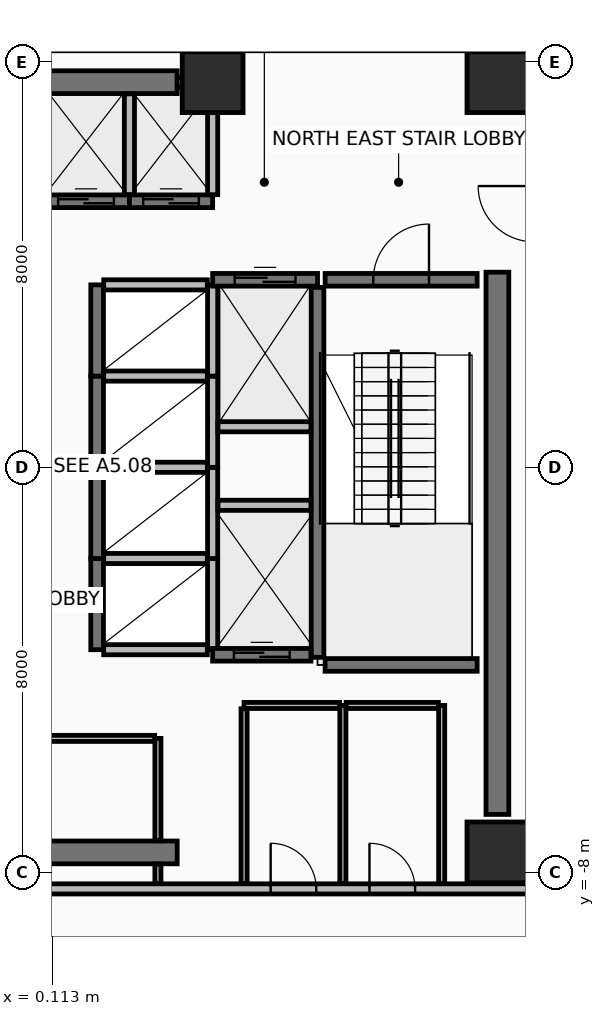
"""IFC4 building model, lengths in metres.
Left out: names, types, materials, properties, quantities, classifications, styles, units other than length and angle.
Written with IfcOpenShell. Run it as: python <this file> out.ifc"""

import sys

from ifc_helpers import new_model, si_unit, direction, frame, frame_2d, origin, origin_2d, place, context, subcontext, project, spatial, rectangle, extrude, element, fill, save


model = new_model("IFC4")
c1 = context("Model", 3, precision=1e-05, world=origin(), true_north=direction((0.0, 1.0)))
c2 = subcontext(c1, "Body", "Model", "MODEL_VIEW")
j1 = project(units=[si_unit("LENGTHUNIT", "METRE"), si_unit("PLANEANGLEUNIT", "RADIAN")], contexts=[c1])
p1 = place(None, origin())
s1 = spatial("IfcSite", under=j1, at=p1, CompositionType="ELEMENT")
p2 = place(p1, origin())
s2 = spatial("IfcBuilding", under=s1, at=p2, CompositionType="ELEMENT")
p3 = place(p2, frame((0.0, 0.0, 160.4)))
s3 = spatial("IfcBuildingStorey", under=s2, at=p3, CompositionType="ELEMENT", Elevation=160.4)
for number, where, z_axis, x_axis in (
    (1, (8.9, -7.6, 0.0), (0.0, 0.0, 1.0), (1.0, 0.0, 0.0)),
    (2, (8.9, 7.6, 0.0), (0.0, 0.0, 1.0), (1.0, 0.0, 0.0)),
    (3, (3.28, 7.6, 0.0), (0.0, 0.0, 1.0), (1.0, 0.0, 0.0)),
):
    element("IfcColumn", number, at=place(p3, frame(where, z_axis=z_axis, x_axis=x_axis)), inside=s3, PredefinedType="COLUMN", context=c2, shape_type="SweptSolid", body=[
        extrude(rectangle(XDim=1.2, YDim=1.2, at=origin_2d()), origin(), (0.0, 0.0, 1.0), 4.75),
    ])
for number, where, z_axis, x_axis in (
    (4, (-2.8, -7.6, 0.0), (0.0, 0.0, 1.0), (1.0, 0.0, 0.0)),
    (5, (-2.8, 7.6, 0.0), (0.0, 0.0, 1.0), (1.0, 0.0, 0.0)),
):
    element("IfcWall", number, at=place(p3, frame(where, z_axis=z_axis, x_axis=x_axis)), inside=s3, PredefinedType="SHEAR", context=c2, shape_type="SweptSolid", body=[
        extrude(rectangle(XDim=5.38, YDim=0.45, at=frame_2d((2.69, 0.0))), origin(), (0.0, 0.0, 1.0), 4.555),
    ])
p4 = place(p3, frame((8.9, -6.85, 0.0), z_axis=(0.0, 0.0, 1.0), x_axis=(0.0, 1.0, 0.0)))
e6 = element("IfcWall", 6, at=p4, inside=s3, PredefinedType="SHEAR", context=c2, shape_type="SweptSolid", body=[
    extrude(rectangle(XDim=10.7, YDim=0.45, at=frame_2d((5.35, 0.0))), origin(), (0.0, 0.0, 1.0), 4.555),
])
p5 = place(p3, frame((-9.62, -8.32, 0.0), z_axis=(0.0, 0.0, 1.0), x_axis=(1.0, 0.0, 0.0)))
e7 = element("IfcWall", 7, at=p5, inside=s3, PredefinedType="PARTITIONING", context=c2, shape_type="SweptSolid", body=[
    extrude(rectangle(XDim=19.24, YDim=0.2, at=frame_2d((9.62, 0.0))), origin(), (0.0, 0.0, 1.0), 2.35),
])
p6 = place(p5, frame((8.57, 0.0, 0.0)))
e8 = element("IfcOpeningElement", 8, at=p6, cuts=e7, PredefinedType="OPENING", context=c2, shape_type="SweptSolid", body=[
    extrude(rectangle(XDim=0.9, YDim=2.1, at=frame_2d((0.45, 1.05))), frame((0.0, 0.11, 0.0), z_axis=(0.0, -1.0, 0.0), x_axis=(1.0, 0.0, 0.0)), (0.0, 0.0, 1.0), 0.22),
])
p7 = place(p5, frame((14.045, 0.0, 0.0)))
e9 = element("IfcOpeningElement", 9, at=p7, cuts=e7, PredefinedType="OPENING", context=c2, shape_type="SweptSolid", body=[
    extrude(rectangle(XDim=0.9, YDim=2.1, at=frame_2d((0.45, 1.05))), frame((0.0, 0.11, 0.0), z_axis=(0.0, -1.0, 0.0), x_axis=(1.0, 0.0, 0.0)), (0.0, 0.0, 1.0), 0.22),
])
p8 = place(p5, frame((15.995, 0.0, 0.0)))
e10 = element("IfcOpeningElement", 10, at=p8, cuts=e7, PredefinedType="OPENING", context=c2, shape_type="SweptSolid", body=[
    extrude(rectangle(XDim=0.9, YDim=2.1, at=frame_2d((0.45, 1.05))), frame((0.0, 0.11, 0.0), z_axis=(0.0, -1.0, 0.0), x_axis=(1.0, 0.0, 0.0)), (0.0, 0.0, 1.0), 0.22),
])
p9 = place(p3, frame((5.35, -3.75, 0.0), z_axis=(0.0, 0.0, 1.0), x_axis=(0.0, 1.0, 0.0)))
e11 = element("IfcWall", 11, at=p9, inside=s3, PredefinedType="SHEAR", context=c2, shape_type="SweptSolid", body=[
    extrude(rectangle(XDim=7.3, YDim=0.25, at=frame_2d((3.65, 0.0))), origin(), (0.0, 0.0, 1.0), 4.555),
])
p10 = place(p3, frame((5.5, 3.7, 0.0), z_axis=(0.0, 0.0, 1.0), x_axis=(1.0, 0.0, 0.0)))
e12 = element("IfcWall", 12, at=p10, inside=s3, PredefinedType="SHEAR", context=c2, shape_type="SweptSolid", body=[
    extrude(rectangle(XDim=3.0, YDim=0.25, at=frame_2d((1.5, 0.0))), origin(), (0.0, 0.0, 1.0), 4.555),
])
p11 = place(p10, frame((0.95, 0.0, 0.0)))
e13 = element("IfcOpeningElement", 13, at=p11, cuts=e12, PredefinedType="OPENING", context=c2, shape_type="SweptSolid", body=[
    extrude(rectangle(XDim=1.1, YDim=2.15, at=frame_2d((0.55, 1.075))), frame((0.0, 0.135, 0.0), z_axis=(0.0, -1.0, 0.0), x_axis=(1.0, 0.0, 0.0)), (0.0, 0.0, 1.0), 0.27),
])
p12 = place(p3, frame((5.5, -3.9, 0.0), z_axis=(0.0, 0.0, 1.0), x_axis=(1.0, 0.0, 0.0)))
e14 = element("IfcWall", 14, at=p12, inside=s3, PredefinedType="SHEAR", context=c2, shape_type="SweptSolid", body=[
    extrude(rectangle(XDim=3.0, YDim=0.25, at=frame_2d((1.5, 0.0))), origin(), (0.0, 0.0, 1.0), 4.555),
])
p13 = place(p3, frame((-0.075, 5.25, 0.0), z_axis=(0.0, 0.0, 1.0), x_axis=(1.0, 0.0, 0.0)))
e15 = element("IfcWall", 15, at=p13, inside=s3, PredefinedType="SHEAR", context=c2, shape_type="SweptSolid", body=[
    extrude(rectangle(XDim=1.712, YDim=0.25, at=frame_2d((0.856, 0.0))), origin(), (0.0, 0.0, 1.0), 4.555),
])
p14 = place(p13, frame((0.306, 0.0, 0.0)))
e16 = element("IfcOpeningElement", 16, at=p14, cuts=e15, PredefinedType="OPENING", context=c2, shape_type="SweptSolid", body=[
    extrude(rectangle(XDim=1.1, YDim=2.2, at=frame_2d((0.55, 1.1))), frame((0.0, 0.135, 0.0), z_axis=(0.0, -1.0, 0.0), x_axis=(1.0, 0.0, 0.0)), (0.0, 0.0, 1.0), 0.27),
])
p15 = place(p3, frame((1.637, 5.38, 0.0), z_axis=(0.0, 0.0, 1.0), x_axis=(0.0, 1.0, 0.0)))
e17 = element("IfcWall", 17, at=p15, inside=s3, PredefinedType="PARTITIONING", context=c2, shape_type="SweptSolid", body=[
    extrude(rectangle(XDim=1.99, YDim=0.2, at=frame_2d((0.995, 0.0))), origin(), (0.0, 0.0, 1.0), 3.75),
])
p16 = place(p3, frame((1.637, 5.25, 0.0), z_axis=(0.0, 0.0, 1.0), x_axis=(1.0, 0.0, 0.0)))
e18 = element("IfcWall", 18, at=p16, inside=s3, PredefinedType="SHEAR", context=c2, shape_type="SweptSolid", body=[
    extrude(rectangle(XDim=1.643, YDim=0.25, at=frame_2d((0.821, 0.0))), origin(), (0.0, 0.0, 1.0), 4.555),
])
p17 = place(p16, frame((0.271, 0.0, 0.0)))
e19 = element("IfcOpeningElement", 19, at=p17, cuts=e18, PredefinedType="OPENING", context=c2, shape_type="SweptSolid", body=[
    extrude(rectangle(XDim=1.1, YDim=2.2, at=frame_2d((0.55, 1.1))), frame((0.0, 0.135, 0.0), z_axis=(0.0, -1.0, 0.0), x_axis=(1.0, 0.0, 0.0)), (0.0, 0.0, 1.0), 0.27),
])
p18 = place(p3, frame((2.58, 7.6, 0.0), z_axis=(0.0, 0.0, 1.0), x_axis=(1.0, 0.0, 0.0)))
e20 = element("IfcWall", 20, at=p18, inside=s3, PredefinedType="PARTITIONING", context=c2, shape_type="SweptSolid", body=[
    extrude(rectangle(XDim=0.7, YDim=0.2, at=frame_2d((0.35, 0.0))), origin(), (0.0, 0.0, 1.0), 2.75),
])
p19 = place(p3, frame((3.28, 5.38, 0.0), z_axis=(0.0, 0.0, 1.0), x_axis=(0.0, 1.0, 0.0)))
e21 = element("IfcWall", 21, at=p19, inside=s3, PredefinedType="PARTITIONING", context=c2, shape_type="SweptSolid", body=[
    extrude(rectangle(XDim=2.115, YDim=0.2, at=frame_2d((1.058, 0.0))), origin(), (0.0, 0.0, 1.0), 2.75),
])
p20 = place(p3, frame((1.0, -3.6, 0.0), z_axis=(0.0, 0.0, 1.0), x_axis=(0.0, 1.0, 0.0)))
e22 = element("IfcWall", 22, at=p20, inside=s3, PredefinedType="SHEAR", context=c2, shape_type="SweptSolid", body=[
    extrude(rectangle(XDim=1.8, YDim=0.25, at=frame_2d((0.9, 0.0))), origin(), (0.0, 0.0, 1.0), 4.555),
])
p21 = place(p3, frame((3.28, -3.6, 0.0), z_axis=(0.0, 0.0, 1.0), x_axis=(0.0, 1.0, 0.0)))
e23 = element("IfcWall", 23, at=p21, inside=s3, PredefinedType="PARTITIONING", context=c2, shape_type="SweptSolid", body=[
    extrude(rectangle(XDim=1.8, YDim=0.2, at=frame_2d((0.9, 0.0))), origin(), (0.0, 0.0, 1.0), 4.555),
])
for number, where, z_axis, x_axis in (
    (24, (1.13, -3.6, 0.0), (0.0, 0.0, 1.0), (1.0, 0.0, 0.0)),
    (25, (1.13, -1.8, 0.0), (0.0, 0.0, 1.0), (1.0, 0.0, 0.0)),
):
    element("IfcWall", number, at=place(p3, frame(where, z_axis=z_axis, x_axis=x_axis)), inside=s3, PredefinedType="PARTITIONING", context=c2, shape_type="SweptSolid", body=[
        extrude(rectangle(XDim=2.045, YDim=0.2, at=frame_2d((1.022, 0.0))), origin(), (0.0, 0.0, 1.0), 4.555),
    ])
p22 = place(p3, frame((1.0, -1.8, 0.0), z_axis=(0.0, 0.0, 1.0), x_axis=(0.0, 1.0, 0.0)))
e26 = element("IfcWall", 26, at=p22, inside=s3, PredefinedType="SHEAR", context=c2, shape_type="SweptSolid", body=[
    extrude(rectangle(XDim=1.8, YDim=0.25, at=frame_2d((0.9, 0.0))), origin(), (0.0, 0.0, 1.0), 4.555),
])
p23 = place(p3, frame((3.28, -1.8, 0.0), z_axis=(0.0, 0.0, 1.0), x_axis=(0.0, 1.0, 0.0)))
e27 = element("IfcWall", 27, at=p23, inside=s3, PredefinedType="PARTITIONING", context=c2, shape_type="SweptSolid", body=[
    extrude(rectangle(XDim=1.8, YDim=0.2, at=frame_2d((0.9, 0.0))), origin(), (0.0, 0.0, 1.0), 4.555),
])
p24 = place(p3, frame((1.13, 0.0, 0.0), z_axis=(0.0, 0.0, 1.0), x_axis=(1.0, 0.0, 0.0)))
e28 = element("IfcWall", 28, at=p24, inside=s3, PredefinedType="PARTITIONING", context=c2, shape_type="SweptSolid", body=[
    extrude(rectangle(XDim=2.045, YDim=0.2, at=frame_2d((1.022, 0.0))), origin(), (0.0, 0.0, 1.0), 4.555),
])
p25 = place(p3, frame((1.0, 0.0, 0.0), z_axis=(0.0, 0.0, 1.0), x_axis=(0.0, 1.0, 0.0)))
e29 = element("IfcWall", 29, at=p25, inside=s3, PredefinedType="SHEAR", context=c2, shape_type="SweptSolid", body=[
    extrude(rectangle(XDim=1.8, YDim=0.25, at=frame_2d((0.9, 0.0))), origin(), (0.0, 0.0, 1.0), 4.555),
])
p26 = place(p3, frame((3.28, 0.0, 0.0), z_axis=(0.0, 0.0, 1.0), x_axis=(0.0, 1.0, 0.0)))
e30 = element("IfcWall", 30, at=p26, inside=s3, PredefinedType="PARTITIONING", context=c2, shape_type="SweptSolid", body=[
    extrude(rectangle(XDim=1.8, YDim=0.2, at=frame_2d((0.9, 0.0))), origin(), (0.0, 0.0, 1.0), 4.555),
])
p27 = place(p3, frame((1.13, 1.8, 0.0), z_axis=(0.0, 0.0, 1.0), x_axis=(1.0, 0.0, 0.0)))
e31 = element("IfcWall", 31, at=p27, inside=s3, PredefinedType="PARTITIONING", context=c2, shape_type="SweptSolid", body=[
    extrude(rectangle(XDim=2.045, YDim=0.2, at=frame_2d((1.022, 0.0))), origin(), (0.0, 0.0, 1.0), 4.555),
])
p28 = place(p3, frame((1.0, 1.8, 0.0), z_axis=(0.0, 0.0, 1.0), x_axis=(0.0, 1.0, 0.0)))
e32 = element("IfcWall", 32, at=p28, inside=s3, PredefinedType="SHEAR", context=c2, shape_type="SweptSolid", body=[
    extrude(rectangle(XDim=1.8, YDim=0.25, at=frame_2d((0.9, 0.0))), origin(), (0.0, 0.0, 1.0), 4.555),
])
p29 = place(p3, frame((3.28, 1.8, 0.0), z_axis=(0.0, 0.0, 1.0), x_axis=(0.0, 1.0, 0.0)))
e33 = element("IfcWall", 33, at=p29, inside=s3, PredefinedType="PARTITIONING", context=c2, shape_type="SweptSolid", body=[
    extrude(rectangle(XDim=1.8, YDim=0.2, at=frame_2d((0.9, 0.0))), origin(), (0.0, 0.0, 1.0), 4.555),
])
p30 = place(p3, frame((1.13, 3.6, 0.0), z_axis=(0.0, 0.0, 1.0), x_axis=(1.0, 0.0, 0.0)))
e34 = element("IfcWall", 34, at=p30, inside=s3, PredefinedType="PARTITIONING", context=c2, shape_type="SweptSolid", body=[
    extrude(rectangle(XDim=2.045, YDim=0.2, at=frame_2d((1.022, 0.0))), origin(), (0.0, 0.0, 1.0), 3.75),
])
p31 = place(p3, frame((3.28, 3.7, 0.0), z_axis=(0.0, 0.0, 1.0), x_axis=(1.0, 0.0, 0.0)))
e35 = element("IfcWall", 35, at=p31, inside=s3, PredefinedType="SHEAR", context=c2, shape_type="SweptSolid", body=[
    extrude(rectangle(XDim=2.07, YDim=0.25, at=frame_2d((1.035, 0.0))), origin(), (0.0, 0.0, 1.0), 4.555),
])
p32 = place(p31, frame((0.435, 0.0, 0.0)))
e36 = element("IfcOpeningElement", 36, at=p32, cuts=e35, PredefinedType="OPENING", context=c2, shape_type="SweptSolid", body=[
    extrude(rectangle(XDim=1.2, YDim=2.2, at=frame_2d((0.6, 1.1))), frame((0.0, 0.135, 0.0), z_axis=(0.0, -1.0, 0.0), x_axis=(1.0, 0.0, 0.0)), (0.0, 0.0, 1.0), 0.27),
])
p33 = place(p3, frame((3.385, 0.8, 0.0), z_axis=(0.0, 0.0, 1.0), x_axis=(1.0, 0.0, 0.0)))
e37 = element("IfcWall", 37, at=p33, inside=s3, PredefinedType="PARTITIONING", context=c2, shape_type="SweptSolid", body=[
    extrude(rectangle(XDim=1.835, YDim=0.2, at=frame_2d((0.917, 0.0))), origin(), (0.0, 0.0, 1.0), 4.555),
])
p34 = place(p3, frame((3.28, -3.7, 0.0), z_axis=(0.0, 0.0, 1.0), x_axis=(1.0, 0.0, 0.0)))
e38 = element("IfcWall", 38, at=p34, inside=s3, PredefinedType="SHEAR", context=c2, shape_type="SweptSolid", body=[
    extrude(rectangle(XDim=1.94, YDim=0.25, at=frame_2d((0.97, 0.0))), origin(), (0.0, 0.0, 1.0), 4.555),
])
p35 = place(p34, frame((0.42, 0.0, 0.0)))
e39 = element("IfcOpeningElement", 39, at=p35, cuts=e38, PredefinedType="OPENING", context=c2, shape_type="SweptSolid", body=[
    extrude(rectangle(XDim=1.1, YDim=2.2, at=frame_2d((0.55, 1.1))), frame((0.0, 0.135, 0.0), z_axis=(0.0, -1.0, 0.0), x_axis=(1.0, 0.0, 0.0)), (0.0, 0.0, 1.0), 0.27),
])
p36 = place(p3, frame((3.385, -0.75, 0.0), z_axis=(0.0, 0.0, 1.0), x_axis=(1.0, 0.0, 0.0)))
e40 = element("IfcWall", 40, at=p36, inside=s3, PredefinedType="PARTITIONING", context=c2, shape_type="SweptSolid", body=[
    extrude(rectangle(XDim=1.835, YDim=0.2, at=frame_2d((0.917, 0.0))), origin(), (0.0, 0.0, 1.0), 4.555),
])
p37 = place(p3, frame((2.2, -8.215, 0.0), z_axis=(0.0, 0.0, 1.0), x_axis=(0.0, 1.0, 0.0)))
e41 = element("IfcWall", 41, at=p37, inside=s3, PredefinedType="PARTITIONING", context=c2, shape_type="SweptSolid", body=[
    extrude(rectangle(XDim=0.385, YDim=0.12, at=frame_2d((0.192, 0.0))), origin(), (0.0, 0.0, 1.0), 3.75),
])
p38 = place(p3, frame((2.2, -7.37, 0.0), z_axis=(0.0, 0.0, 1.0), x_axis=(0.0, 1.0, 0.0)))
e42 = element("IfcWall", 42, at=p38, inside=s3, PredefinedType="PARTITIONING", context=c2, shape_type="SweptSolid", body=[
    extrude(rectangle(XDim=2.02, YDim=0.12, at=frame_2d((1.01, 0.0))), origin(), (0.0, 0.0, 1.0), 3.75),
])
p39 = place(p3, frame((2.135, -5.35, 0.0), z_axis=(0.0, 0.0, 1.0), x_axis=(-1.0, 0.0, 0.0)))
e43 = element("IfcWall", 43, at=p39, inside=s3, PredefinedType="PARTITIONING", context=c2, shape_type="SweptSolid", body=[
    extrude(rectangle(XDim=5.535, YDim=0.12, at=frame_2d((2.768, 0.0))), origin(), (0.0, 0.0, 1.0), 3.75),
])
p40 = place(p3, frame((5.85, -8.215, 0.0), z_axis=(0.0, 0.0, 1.0), x_axis=(0.0, 1.0, 0.0)))
e44 = element("IfcWall", 44, at=p40, inside=s3, PredefinedType="PARTITIONING", context=c2, shape_type="SweptSolid", body=[
    extrude(rectangle(XDim=3.515, YDim=0.12, at=frame_2d((1.758, 0.0))), origin(), (0.0, 0.0, 1.0), 3.75),
])
p41 = place(p3, frame((5.785, -4.7, 0.0), z_axis=(0.0, 0.0, 1.0), x_axis=(-1.0, 0.0, 0.0)))
e45 = element("IfcWall", 45, at=p41, inside=s3, PredefinedType="PARTITIONING", context=c2, shape_type="SweptSolid", body=[
    extrude(rectangle(XDim=1.885, YDim=0.12, at=frame_2d((0.942, 0.0))), origin(), (0.0, 0.0, 1.0), 4.555),
])
p42 = place(p3, frame((3.9, -4.765, 0.0), z_axis=(0.0, 0.0, 1.0), x_axis=(0.0, -1.0, 0.0)))
e46 = element("IfcWall", 46, at=p42, inside=s3, PredefinedType="PARTITIONING", context=c2, shape_type="SweptSolid", body=[
    extrude(rectangle(XDim=3.45, YDim=0.12, at=frame_2d((1.725, 0.0))), origin(), (0.0, 0.0, 1.0), 3.75),
])
p43 = place(p3, frame((7.8, -8.215, 0.0), z_axis=(0.0, 0.0, 1.0), x_axis=(0.0, 1.0, 0.0)))
e47 = element("IfcWall", 47, at=p43, inside=s3, PredefinedType="PARTITIONING", context=c2, shape_type="SweptSolid", body=[
    extrude(rectangle(XDim=3.515, YDim=0.12, at=frame_2d((1.758, 0.0))), origin(), (0.0, 0.0, 1.0), 3.75),
])
p44 = place(p3, frame((7.735, -4.7, 0.0), z_axis=(0.0, 0.0, 1.0), x_axis=(-1.0, 0.0, 0.0)))
e48 = element("IfcWall", 48, at=p44, inside=s3, PredefinedType="PARTITIONING", context=c2, shape_type="SweptSolid", body=[
    extrude(rectangle(XDim=1.82, YDim=0.12, at=frame_2d((0.91, 0.0))), origin(), (0.0, 0.0, 1.0), 4.555),
])
p45 = place(p11, frame((1.1, 0.0, 0.0), z_axis=(0.0, 0.0, 1.0), x_axis=(-1.0, 0.0, 0.0)))
e49 = element("IfcDoor", 49, at=p45, inside=s3, OperationType="SINGLE_SWING_LEFT", PredefinedType="DOOR", context=c2, shape_type="SweptSolid", body=[
    extrude(rectangle(XDim=1.1, YDim=2.15, at=frame_2d((0.55, 1.075))), frame((0.0, 0.025, 0.0), z_axis=(0.0, -1.0, 0.0), x_axis=(1.0, 0.0, 0.0)), (0.0, 0.0, 1.0), 0.05),
])
fill(e13, e49)
p46 = place(p14, origin())
e50 = element("IfcDoor", 50, at=p46, inside=s3, OperationType="SLIDING_TO_LEFT", PredefinedType="DOOR", context=c2, shape_type="SweptSolid", body=[
    extrude(rectangle(XDim=1.1, YDim=2.2, at=frame_2d((0.55, 1.1))), frame((0.0, 0.025, 0.0), z_axis=(0.0, -1.0, 0.0), x_axis=(1.0, 0.0, 0.0)), (0.0, 0.0, 1.0), 0.05),
])
fill(e16, e50)
p47 = place(p17, origin())
e51 = element("IfcDoor", 51, at=p47, inside=s3, OperationType="SLIDING_TO_LEFT", PredefinedType="DOOR", context=c2, shape_type="SweptSolid", body=[
    extrude(rectangle(XDim=1.1, YDim=2.2, at=frame_2d((0.55, 1.1))), frame((0.0, 0.025, 0.0), z_axis=(0.0, -1.0, 0.0), x_axis=(1.0, 0.0, 0.0)), (0.0, 0.0, 1.0), 0.05),
])
fill(e19, e51)
p48 = place(p32, origin())
e52 = element("IfcDoor", 52, at=p48, inside=s3, OperationType="SLIDING_TO_RIGHT", PredefinedType="DOOR", context=c2, shape_type="SweptSolid", body=[
    extrude(rectangle(XDim=1.2, YDim=2.2, at=frame_2d((0.6, 1.1))), frame((0.0, 0.025, 0.0), z_axis=(0.0, -1.0, 0.0), x_axis=(1.0, 0.0, 0.0)), (0.0, 0.0, 1.0), 0.05),
])
fill(e36, e52)
p49 = place(p35, origin())
e53 = element("IfcDoor", 53, at=p49, inside=s3, OperationType="SLIDING_TO_LEFT", PredefinedType="DOOR", context=c2, shape_type="SweptSolid", body=[
    extrude(rectangle(XDim=1.1, YDim=2.2, at=frame_2d((0.55, 1.1))), frame((0.0, 0.025, 0.0), z_axis=(0.0, -1.0, 0.0), x_axis=(1.0, 0.0, 0.0)), (0.0, 0.0, 1.0), 0.05),
])
fill(e39, e53)
p50 = place(p7, origin())
e54 = element("IfcDoor", 54, at=p50, inside=s3, OperationType="SINGLE_SWING_LEFT", PredefinedType="DOOR", context=c2, shape_type="SweptSolid", body=[
    extrude(rectangle(XDim=0.9, YDim=2.1, at=frame_2d((0.45, 1.05))), frame((0.0, 0.025, 0.0), z_axis=(0.0, -1.0, 0.0), x_axis=(1.0, 0.0, 0.0)), (0.0, 0.0, 1.0), 0.05),
])
fill(e9, e54)
p51 = place(p8, origin())
e55 = element("IfcDoor", 55, at=p51, inside=s3, OperationType="SINGLE_SWING_LEFT", PredefinedType="DOOR", context=c2, shape_type="SweptSolid", body=[
    extrude(rectangle(XDim=0.9, YDim=2.1, at=frame_2d((0.45, 1.05))), frame((0.0, 0.025, 0.0), z_axis=(0.0, -1.0, 0.0), x_axis=(1.0, 0.0, 0.0)), (0.0, 0.0, 1.0), 0.05),
])
fill(e10, e55)
save(model, sys.argv[1])
